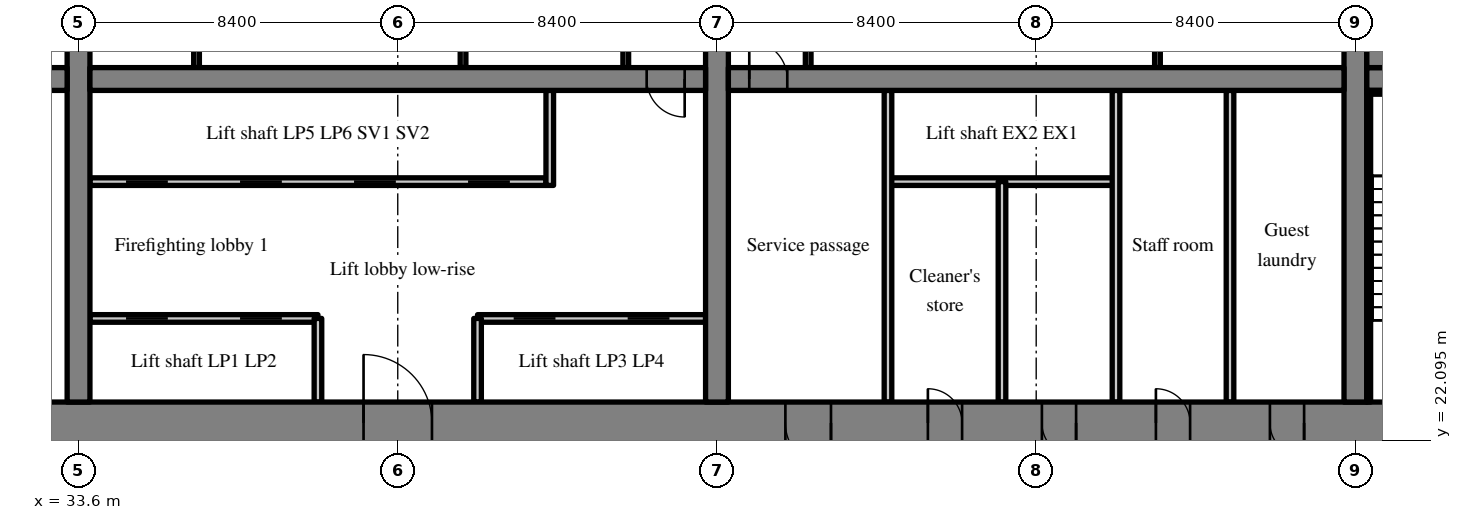
"""IFC4 building model, lengths in metres.
Left out: names, types, materials, properties, quantities, classifications, styles, units other than length and angle.
Written with IfcOpenShell. Run it as: python <this file> out.ifc"""

import sys

from ifc_helpers import new_model, si_unit, direction, frame, frame_2d, origin, place, context, subcontext, project, spatial, rectangle, extrude, source, transform, mapped, element, fill, save


model = new_model("IFC4")
c1 = context("Model", 3, precision=1e-05, world=origin(), true_north=direction((0.0, 1.0)))
c2 = subcontext(c1, "Body", "Model", "MODEL_VIEW")
j1 = project(units=[si_unit("LENGTHUNIT", "METRE"), si_unit("PLANEANGLEUNIT", "RADIAN")], contexts=[c1])
p1 = place(None, origin())
s1 = spatial("IfcSite", under=j1, at=p1, CompositionType="ELEMENT")
p2 = place(p1, origin())
s2 = spatial("IfcBuilding", under=s1, at=p2, CompositionType="ELEMENT")
p3 = place(p2, frame((0.0, 0.0, 39.2)))
s3 = spatial("IfcBuildingStorey", under=s2, at=p3, CompositionType="ELEMENT", Elevation=39.2)
m1 = source(origin(), c2, "Body", "SweptSolid", [
    extrude(rectangle(XDim=50.4, YDim=1.1, at=frame_2d((25.2, 0.0))), origin(), (0.0, 0.0, 1.0), 3.52),
])
p4 = place(p3, frame((25.2, 22.55, 0.0), z_axis=(0.0, 0.0, 1.0), x_axis=(1.0, 0.0, 0.0)))
e1 = element("IfcWall", 1, at=p4, inside=s3, PredefinedType="SHEAR", context=c2, shape_type="MappedRepresentation", body=[
    mapped(m1, transform((0.0, 0.0, 0.0), scale=1.0)),
])
m2 = source(origin(), c2, "Body", "SweptSolid", [
    extrude(rectangle(XDim=1.8, YDim=2.1, at=frame_2d((0.9, 1.05))), frame((0.0, 0.56, 0.0), z_axis=(0.0, -1.0, 0.0), x_axis=(1.0, 0.0, 0.0)), (0.0, 0.0, 1.0), 1.12),
])
p5 = place(p4, frame((15.9, 0.0, 0.0)))
e2 = element("IfcOpeningElement", 2, at=p5, cuts=e1, PredefinedType="OPENING", context=c2, shape_type="MappedRepresentation", body=[
    mapped(m2, transform((0.0, 0.0, 0.0), scale=1.0)),
])
m3 = source(origin(), c2, "Body", "SweptSolid", [
    extrude(rectangle(XDim=1.2, YDim=2.1, at=frame_2d((0.6, 1.05))), frame((0.0, 0.56, 0.0), z_axis=(0.0, -1.0, 0.0), x_axis=(1.0, 0.0, 0.0)), (0.0, 0.0, 1.0), 1.12),
])
p6 = place(p4, frame((27.0, 0.0, 0.0)))
e3 = element("IfcOpeningElement", 3, at=p6, cuts=e1, PredefinedType="OPENING", context=c2, shape_type="MappedRepresentation", body=[
    mapped(m3, transform((0.0, 0.0, 0.0), scale=1.0)),
])
m4 = source(origin(), c2, "Body", "SweptSolid", [
    extrude(rectangle(XDim=0.9, YDim=2.1, at=frame_2d((0.45, 1.05))), frame((0.0, 0.56, 0.0), z_axis=(0.0, -1.0, 0.0), x_axis=(1.0, 0.0, 0.0)), (0.0, 0.0, 1.0), 1.12),
])
p7 = place(p4, frame((33.75, 0.0, 0.0)))
e4 = element("IfcOpeningElement", 4, at=p7, cuts=e1, PredefinedType="OPENING", context=c2, shape_type="MappedRepresentation", body=[
    mapped(m4, transform((0.0, 0.0, 0.0), scale=1.0)),
])
p8 = place(p4, frame((30.75, 0.0, 0.0)))
e5 = element("IfcOpeningElement", 5, at=p8, cuts=e1, PredefinedType="OPENING", context=c2, shape_type="MappedRepresentation", body=[
    mapped(m4, transform((0.0, 0.0, 0.0), scale=1.0)),
])
p9 = place(p4, frame((39.75, 0.0, 0.0)))
e6 = element("IfcOpeningElement", 6, at=p9, cuts=e1, PredefinedType="OPENING", context=c2, shape_type="MappedRepresentation", body=[
    mapped(m4, transform((0.0, 0.0, 0.0), scale=1.0)),
])
p10 = place(p4, frame((36.75, 0.0, 0.0)))
e7 = element("IfcOpeningElement", 7, at=p10, cuts=e1, PredefinedType="OPENING", context=c2, shape_type="MappedRepresentation", body=[
    mapped(m4, transform((0.0, 0.0, 0.0), scale=1.0)),
])
p11 = place(p4, frame((6.425, 0.0, 0.0)))
e8 = element("IfcOpeningElement", 8, at=p11, cuts=e1, PredefinedType="OPENING", context=c2, shape_type="MappedRepresentation", body=[
    mapped(m3, transform((0.0, 0.0, 0.0), scale=1.0)),
])
p12 = place(p4, frame((47.675, 0.0, 0.0)))
e9 = element("IfcOpeningElement", 9, at=p12, cuts=e1, PredefinedType="OPENING", context=c2, shape_type="MappedRepresentation", body=[
    mapped(m3, transform((0.0, 0.0, 0.0), scale=1.0)),
])
m5 = source(origin(), c2, "Body", "SweptSolid", [
    extrude(rectangle(XDim=17.8, YDim=0.6, at=frame_2d((8.9, 0.0))), origin(), (0.0, 0.0, 1.0), 3.52),
])
p13 = place(p3, frame((33.6, 23.1, 0.0), z_axis=(0.0, 0.0, 1.0), x_axis=(0.0, 1.0, 0.0)))
e10 = element("IfcWall", 10, at=p13, inside=s3, PredefinedType="SHEAR", context=c2, shape_type="MappedRepresentation", body=[
    mapped(m5, transform((0.0, 0.0, 0.0), scale=1.0)),
])
m6 = source(origin(), c2, "Body", "SweptSolid", [
    extrude(rectangle(XDim=1.1, YDim=2.1, at=frame_2d((0.55, 1.05))), frame((0.0, 0.31, 0.0), z_axis=(0.0, -1.0, 0.0), x_axis=(1.0, 0.0, 0.0)), (0.0, 0.0, 1.0), 0.62),
])
p14 = place(p13, frame((12.35, 0.0, 0.0)))
e11 = element("IfcOpeningElement", 11, at=p14, cuts=e10, PredefinedType="OPENING", context=c2, shape_type="MappedRepresentation", body=[
    mapped(m6, transform((0.0, 0.0, 0.0), scale=1.0)),
])
p15 = place(p3, frame((50.4, 23.1, 0.0), z_axis=(0.0, 0.0, 1.0), x_axis=(0.0, 1.0, 0.0)))
e12 = element("IfcWall", 12, at=p15, inside=s3, PredefinedType="SHEAR", context=c2, shape_type="MappedRepresentation", body=[
    mapped(m5, transform((0.0, 0.0, 0.0), scale=1.0)),
])
p16 = place(p15, frame((12.35, 0.0, 0.0)))
e13 = element("IfcOpeningElement", 13, at=p16, cuts=e12, PredefinedType="OPENING", context=c2, shape_type="MappedRepresentation", body=[
    mapped(m6, transform((0.0, 0.0, 0.0), scale=1.0)),
])
p17 = place(p3, frame((67.2, 23.1, 0.0), z_axis=(0.0, 0.0, 1.0), x_axis=(0.0, 1.0, 0.0)))
e14 = element("IfcWall", 14, at=p17, inside=s3, PredefinedType="SHEAR", context=c2, shape_type="MappedRepresentation", body=[
    mapped(m5, transform((0.0, 0.0, 0.0), scale=1.0)),
])
m7 = source(origin(), c2, "Body", "SweptSolid", [
    extrude(rectangle(XDim=7.0, YDim=0.6, at=frame_2d((3.5, 0.0))), origin(), (0.0, 0.0, 1.0), 3.52),
])
p18 = place(p3, frame((26.3, 31.6, 0.0), z_axis=(0.0, 0.0, 1.0), x_axis=(1.0, 0.0, 0.0)))
e15 = element("IfcWall", 15, at=p18, inside=s3, PredefinedType="SHEAR", context=c2, shape_type="MappedRepresentation", body=[
    mapped(m7, transform((0.0, 0.0, 0.0), scale=1.0)),
])
p19 = place(p18, frame((5.375, 0.0, 0.0)))
e16 = element("IfcOpeningElement", 16, at=p19, cuts=e15, PredefinedType="OPENING", context=c2, shape_type="MappedRepresentation", body=[
    mapped(m6, transform((0.0, 0.0, 0.0), scale=1.0)),
])
m8 = source(origin(), c2, "Body", "SweptSolid", [
    extrude(rectangle(XDim=16.2, YDim=0.6, at=frame_2d((8.1, 0.0))), origin(), (0.0, 0.0, 1.0), 3.52),
])
p20 = place(p3, frame((33.9, 31.6, 0.0), z_axis=(0.0, 0.0, 1.0), x_axis=(1.0, 0.0, 0.0)))
e17 = element("IfcWall", 17, at=p20, inside=s3, PredefinedType="SHEAR", context=c2, shape_type="MappedRepresentation", body=[
    mapped(m8, transform((0.0, 0.0, 0.0), scale=1.0)),
])
m9 = source(origin(), c2, "Body", "SweptSolid", [
    extrude(rectangle(XDim=1.0, YDim=2.1, at=frame_2d((0.5, 1.05))), frame((0.0, 0.31, 0.0), z_axis=(0.0, -1.0, 0.0), x_axis=(1.0, 0.0, 0.0)), (0.0, 0.0, 1.0), 0.62),
])
p21 = place(p20, frame((14.65, 0.0, 0.0)))
e18 = element("IfcOpeningElement", 18, at=p21, cuts=e17, PredefinedType="OPENING", context=c2, shape_type="MappedRepresentation", body=[
    mapped(m9, transform((0.0, 0.0, 0.0), scale=1.0)),
])
m10 = source(origin(), c2, "Body", "SweptSolid", [
    extrude(rectangle(XDim=16.2, YDim=0.6, at=frame_2d((8.1, 0.0))), origin(), (0.0, 0.0, 1.0), 3.52),
])
p22 = place(p3, frame((50.7, 31.6, 0.0), z_axis=(0.0, 0.0, 1.0), x_axis=(1.0, 0.0, 0.0)))
e19 = element("IfcWall", 19, at=p22, inside=s3, PredefinedType="SHEAR", context=c2, shape_type="MappedRepresentation", body=[
    mapped(m10, transform((0.0, 0.0, 0.0), scale=1.0)),
])
p23 = place(p22, frame((0.55, 0.0, 0.0)))
e20 = element("IfcOpeningElement", 20, at=p23, cuts=e19, PredefinedType="OPENING", context=c2, shape_type="MappedRepresentation", body=[
    mapped(m9, transform((0.0, 0.0, 0.0), scale=1.0)),
])
p24 = place(p3, frame((67.5, 31.6, 0.0), z_axis=(0.0, 0.0, 1.0), x_axis=(1.0, 0.0, 0.0)))
e21 = element("IfcWall", 21, at=p24, inside=s3, PredefinedType="SHEAR", context=c2, shape_type="MappedRepresentation", body=[
    mapped(m7, transform((0.0, 0.0, 0.0), scale=1.0)),
])
p25 = place(p24, frame((5.425, 0.0, 0.0)))
e22 = element("IfcOpeningElement", 22, at=p25, cuts=e21, PredefinedType="OPENING", context=c2, shape_type="MappedRepresentation", body=[
    mapped(m6, transform((0.0, 0.0, 0.0), scale=1.0)),
])
m11 = source(origin(), c2, "Body", "SweptSolid", [
    extrude(rectangle(XDim=6.0, YDim=0.2, at=frame_2d((3.0, 0.0))), origin(), (0.0, 0.0, 1.0), 3.52),
])
p26 = place(p3, frame((33.9, 25.3, 0.0), z_axis=(0.0, 0.0, 1.0), x_axis=(1.0, 0.0, 0.0)))
e23 = element("IfcWall", 23, at=p26, inside=s3, PredefinedType="SOLIDWALL", context=c2, shape_type="MappedRepresentation", body=[
    mapped(m11, transform((0.0, 0.0, 0.0), scale=1.0)),
])
m12 = source(origin(), c2, "Body", "SweptSolid", [
    extrude(rectangle(XDim=1.1, YDim=2.1, at=frame_2d((0.55, 1.05))), frame((0.0, 0.11, 0.0), z_axis=(0.0, -1.0, 0.0), x_axis=(1.0, 0.0, 0.0)), (0.0, 0.0, 1.0), 0.22),
])
p27 = place(p26, frame((0.95, 0.0, 0.0)))
e24 = element("IfcOpeningElement", 24, at=p27, cuts=e23, PredefinedType="OPENING", context=c2, shape_type="MappedRepresentation", body=[
    mapped(m12, transform((0.0, 0.0, 0.0), scale=1.0)),
])
p28 = place(p26, frame((3.95, 0.0, 0.0)))
e25 = element("IfcOpeningElement", 25, at=p28, cuts=e23, PredefinedType="OPENING", context=c2, shape_type="MappedRepresentation", body=[
    mapped(m12, transform((0.0, 0.0, 0.0), scale=1.0)),
])
p29 = place(p3, frame((44.1, 25.3, 0.0), z_axis=(0.0, 0.0, 1.0), x_axis=(1.0, 0.0, 0.0)))
e26 = element("IfcWall", 26, at=p29, inside=s3, PredefinedType="SOLIDWALL", context=c2, shape_type="MappedRepresentation", body=[
    mapped(m11, transform((0.0, 0.0, 0.0), scale=1.0)),
])
p30 = place(p29, frame((0.95, 0.0, 0.0)))
e27 = element("IfcOpeningElement", 27, at=p30, cuts=e26, PredefinedType="OPENING", context=c2, shape_type="MappedRepresentation", body=[
    mapped(m12, transform((0.0, 0.0, 0.0), scale=1.0)),
])
p31 = place(p29, frame((3.95, 0.0, 0.0)))
e28 = element("IfcOpeningElement", 28, at=p31, cuts=e26, PredefinedType="OPENING", context=c2, shape_type="MappedRepresentation", body=[
    mapped(m12, transform((0.0, 0.0, 0.0), scale=1.0)),
])
m13 = source(origin(), c2, "Body", "SweptSolid", [
    extrude(rectangle(XDim=12.0, YDim=0.2, at=frame_2d((6.0, 0.0))), origin(), (0.0, 0.0, 1.0), 3.52),
])
p32 = place(p3, frame((33.9, 28.9, 0.0), z_axis=(0.0, 0.0, 1.0), x_axis=(1.0, 0.0, 0.0)))
e29 = element("IfcWall", 29, at=p32, inside=s3, PredefinedType="SOLIDWALL", context=c2, shape_type="MappedRepresentation", body=[
    mapped(m13, transform((0.0, 0.0, 0.0), scale=1.0)),
])
p33 = place(p32, frame((0.95, 0.0, 0.0)))
e30 = element("IfcOpeningElement", 30, at=p33, cuts=e29, PredefinedType="OPENING", context=c2, shape_type="MappedRepresentation", body=[
    mapped(m12, transform((0.0, 0.0, 0.0), scale=1.0)),
])
p34 = place(p32, frame((3.95, 0.0, 0.0)))
e31 = element("IfcOpeningElement", 31, at=p34, cuts=e29, PredefinedType="OPENING", context=c2, shape_type="MappedRepresentation", body=[
    mapped(m12, transform((0.0, 0.0, 0.0), scale=1.0)),
])
p35 = place(p32, frame((6.95, 0.0, 0.0)))
e32 = element("IfcOpeningElement", 32, at=p35, cuts=e29, PredefinedType="OPENING", context=c2, shape_type="MappedRepresentation", body=[
    mapped(m12, transform((0.0, 0.0, 0.0), scale=1.0)),
])
p36 = place(p32, frame((9.95, 0.0, 0.0)))
e33 = element("IfcOpeningElement", 33, at=p36, cuts=e29, PredefinedType="OPENING", context=c2, shape_type="MappedRepresentation", body=[
    mapped(m12, transform((0.0, 0.0, 0.0), scale=1.0)),
])
m14 = source(origin(), c2, "Body", "SweptSolid", [
    extrude(rectangle(XDim=2.2, YDim=0.2, at=frame_2d((1.1, 0.0))), origin(), (0.0, 0.0, 1.0), 3.52),
])
for number, where, z_axis, x_axis in (
    (34, (39.9, 23.1, 0.0), (0.0, 0.0, 1.0), (0.0, 1.0, 0.0)),
    (35, (44.1, 23.1, 0.0), (0.0, 0.0, 1.0), (0.0, 1.0, 0.0)),
):
    element("IfcWall", number, at=place(p3, frame(where, z_axis=z_axis, x_axis=x_axis)), inside=s3, PredefinedType="SOLIDWALL", context=c2, shape_type="MappedRepresentation", body=[
        mapped(m14, transform((0.0, 0.0, 0.0), scale=1.0)),
    ])
m15 = source(origin(), c2, "Body", "SweptSolid", [
    extrude(rectangle(XDim=2.5, YDim=0.2, at=frame_2d((1.25, 0.0))), origin(), (0.0, 0.0, 1.0), 3.52),
])
p37 = place(p3, frame((46.0, 28.8, 0.0), z_axis=(0.0, 0.0, 1.0), x_axis=(0.0, 1.0, 0.0)))
e36 = element("IfcWall", 36, at=p37, inside=s3, PredefinedType="SOLIDWALL", context=c2, shape_type="MappedRepresentation", body=[
    mapped(m15, transform((0.0, 0.0, 0.0), scale=1.0)),
])
m16 = source(origin(), c2, "Body", "SweptSolid", [
    extrude(rectangle(XDim=3.1, YDim=0.15, at=frame_2d((1.55, 0.0))), origin(), (0.0, 0.0, 1.0), 3.52),
])
for number, where, z_axis, x_axis in (
    (37, (48.0, 31.9, 0.0), (0.0, 0.0, 1.0), (0.0, 1.0, 0.0)),
    (38, (36.705, 31.9, 0.0), (0.0, 0.0, 1.0), (0.0, 1.0, 0.0)),
    (39, (43.718, 31.9, 0.0), (0.0, 0.0, 1.0), (0.0, 1.0, 0.0)),
):
    element("IfcWall", number, at=place(p3, frame(where, z_axis=z_axis, x_axis=x_axis)), inside=s3, PredefinedType="PARTITIONING", context=c2, shape_type="MappedRepresentation", body=[
        mapped(m16, transform((0.0, 0.0, 0.0), scale=1.0)),
    ])
p38 = place(p3, frame((60.9, 28.9, 0.0), z_axis=(0.0, 0.0, 1.0), x_axis=(-1.0, 0.0, 0.0)))
e40 = element("IfcWall", 40, at=p38, inside=s3, PredefinedType="SOLIDWALL", context=c2, shape_type="MappedRepresentation", body=[
    mapped(m11, transform((0.0, 0.0, 0.0), scale=1.0)),
])
m17 = source(origin(), c2, "Body", "SweptSolid", [
    extrude(rectangle(XDim=8.2, YDim=0.2, at=frame_2d((4.1, 0.0))), origin(), (0.0, 0.0, 1.0), 3.52),
])
for number, where, z_axis, x_axis in (
    (41, (54.9, 23.1, 0.0), (0.0, 0.0, 1.0), (0.0, 1.0, 0.0)),
    (42, (60.9, 23.1, 0.0), (0.0, 0.0, 1.0), (0.0, 1.0, 0.0)),
):
    element("IfcWall", number, at=place(p3, frame(where, z_axis=z_axis, x_axis=x_axis)), inside=s3, PredefinedType="PARTITIONING", context=c2, shape_type="MappedRepresentation", body=[
        mapped(m17, transform((0.0, 0.0, 0.0), scale=1.0)),
    ])
m18 = source(origin(), c2, "Body", "SweptSolid", [
    extrude(rectangle(XDim=5.8, YDim=0.2, at=frame_2d((2.9, 0.0))), origin(), (0.0, 0.0, 1.0), 3.52),
])
p39 = place(p3, frame((57.9, 23.1, 0.0), z_axis=(0.0, 0.0, 1.0), x_axis=(0.0, 1.0, 0.0)))
e43 = element("IfcWall", 43, at=p39, inside=s3, PredefinedType="PARTITIONING", context=c2, shape_type="MappedRepresentation", body=[
    mapped(m18, transform((0.0, 0.0, 0.0), scale=1.0)),
])
p40 = place(p3, frame((63.9, 23.1, 0.0), z_axis=(0.0, 0.0, 1.0), x_axis=(0.0, 1.0, 0.0)))
e44 = element("IfcWall", 44, at=p40, inside=s3, PredefinedType="PARTITIONING", context=c2, shape_type="MappedRepresentation", body=[
    mapped(m17, transform((0.0, 0.0, 0.0), scale=1.0)),
])
for number, where, z_axis, x_axis in (
    (45, (52.8, 31.9, 0.0), (0.0, 0.0, 1.0), (0.0, 1.0, 0.0)),
    (46, (61.991, 31.9, 0.0), (0.0, 0.0, 1.0), (0.0, 1.0, 0.0)),
):
    element("IfcWall", number, at=place(p3, frame(where, z_axis=z_axis, x_axis=x_axis)), inside=s3, PredefinedType="PARTITIONING", context=c2, shape_type="MappedRepresentation", body=[
        mapped(m16, transform((0.0, 0.0, 0.0), scale=1.0)),
    ])
m19 = source(origin(), c2, "Body", "SweptSolid", [
    extrude(rectangle(XDim=4.75, YDim=0.1, at=frame_2d((2.375, 0.0))), origin(), (0.0, 0.0, 1.0), 3.52),
])
p41 = place(p3, frame((67.5, 31.25, 0.0), z_axis=(0.0, 0.0, 1.0), x_axis=(1.0, 0.0, 0.0)))
e47 = element("IfcWall", 47, at=p41, inside=s3, PredefinedType="SOLIDWALL", context=c2, shape_type="MappedRepresentation", body=[
    mapped(m19, transform((0.0, 0.0, 0.0), scale=1.0)),
])
m20 = source(origin(), c2, "Body", "SweptSolid", [
    extrude(rectangle(XDim=8.1, YDim=0.1, at=frame_2d((4.05, 0.0))), origin(), (0.0, 0.0, 1.0), 3.52),
])
p42 = place(p3, frame((67.55, 23.1, 0.0), z_axis=(0.0, 0.0, 1.0), x_axis=(0.0, 1.0, 0.0)))
e48 = element("IfcWall", 48, at=p42, inside=s3, PredefinedType="SOLIDWALL", context=c2, shape_type="MappedRepresentation", body=[
    mapped(m20, transform((0.0, 0.0, 0.0), scale=1.0)),
])
m21 = source(origin(), c2, "Body", "SweptSolid", [
    extrude(rectangle(XDim=4.75, YDim=0.9, at=frame_2d((2.375, 0.0))), origin(), (0.0, 0.0, 1.0), 3.52),
])
p43 = place(p3, frame((67.5, 32.35, 0.0), z_axis=(0.0, 0.0, 1.0), x_axis=(1.0, 0.0, 0.0)))
e49 = element("IfcWall", 49, at=p43, inside=s3, PredefinedType="SOLIDWALL", context=c2, shape_type="MappedRepresentation", body=[
    mapped(m21, transform((0.0, 0.0, 0.0), scale=1.0)),
])
m22 = source(origin(), c2, "Body", "SweptSolid", [
    extrude(rectangle(XDim=1.8, YDim=2.1, at=frame_2d((0.9, 1.05))), frame((0.0, 0.325, 0.0), z_axis=(0.0, -1.0, 0.0), x_axis=(1.0, 0.0, 0.0)), (0.0, 0.0, 1.0), 0.05),
])
p44 = place(p5, origin())
e50 = element("IfcDoor", 50, at=p44, inside=s3, OperationType="DOUBLE_DOOR_SINGLE_SWING", PredefinedType="DOOR", context=c2, shape_type="MappedRepresentation", body=[
    mapped(m22, transform((0.0, 0.0, 0.0), scale=1.0)),
])
fill(e2, e50)
m23 = source(origin(), c2, "Body", "SweptSolid", [
    extrude(rectangle(XDim=1.0, YDim=2.1, at=frame_2d((0.5, 1.05))), frame((0.0, 0.025, 0.0), z_axis=(0.0, -1.0, 0.0), x_axis=(1.0, 0.0, 0.0)), (0.0, 0.0, 1.0), 0.05),
])
p45 = place(p21, origin())
e51 = element("IfcDoor", 51, at=p45, inside=s3, OperationType="SINGLE_SWING_RIGHT", PredefinedType="DOOR", context=c2, shape_type="MappedRepresentation", body=[
    mapped(m23, transform((0.0, 0.0, 0.0), scale=1.0)),
])
fill(e18, e51)
m24 = source(origin(), c2, "Body", "SweptSolid", [
    extrude(rectangle(XDim=1.1, YDim=2.1, at=frame_2d((0.55, 1.05))), frame((0.0, 0.025, 0.0), z_axis=(0.0, -1.0, 0.0), x_axis=(1.0, 0.0, 0.0)), (0.0, 0.0, 1.0), 0.05),
])
p46 = place(p27, origin())
e52 = element("IfcDoor", 52, at=p46, inside=s3, OperationType="SLIDING_TO_LEFT", PredefinedType="DOOR", context=c2, shape_type="MappedRepresentation", body=[
    mapped(m24, transform((0.0, 0.0, 0.0), scale=1.0)),
])
fill(e24, e52)
p47 = place(p28, origin())
e53 = element("IfcDoor", 53, at=p47, inside=s3, OperationType="SLIDING_TO_RIGHT", PredefinedType="DOOR", context=c2, shape_type="MappedRepresentation", body=[
    mapped(m24, transform((0.0, 0.0, 0.0), scale=1.0)),
])
fill(e25, e53)
p48 = place(p30, origin())
e54 = element("IfcDoor", 54, at=p48, inside=s3, OperationType="SLIDING_TO_LEFT", PredefinedType="DOOR", context=c2, shape_type="MappedRepresentation", body=[
    mapped(m24, transform((0.0, 0.0, 0.0), scale=1.0)),
])
fill(e27, e54)
p49 = place(p31, origin())
e55 = element("IfcDoor", 55, at=p49, inside=s3, OperationType="SLIDING_TO_RIGHT", PredefinedType="DOOR", context=c2, shape_type="MappedRepresentation", body=[
    mapped(m24, transform((0.0, 0.0, 0.0), scale=1.0)),
])
fill(e28, e55)
p50 = place(p33, origin())
e56 = element("IfcDoor", 56, at=p50, inside=s3, OperationType="SLIDING_TO_LEFT", PredefinedType="DOOR", context=c2, shape_type="MappedRepresentation", body=[
    mapped(m24, transform((0.0, 0.0, 0.0), scale=1.0)),
])
fill(e30, e56)
p51 = place(p34, origin())
e57 = element("IfcDoor", 57, at=p51, inside=s3, OperationType="SLIDING_TO_RIGHT", PredefinedType="DOOR", context=c2, shape_type="MappedRepresentation", body=[
    mapped(m24, transform((0.0, 0.0, 0.0), scale=1.0)),
])
fill(e31, e57)
p52 = place(p35, origin())
e58 = element("IfcDoor", 58, at=p52, inside=s3, OperationType="SLIDING_TO_LEFT", PredefinedType="DOOR", context=c2, shape_type="MappedRepresentation", body=[
    mapped(m24, transform((0.0, 0.0, 0.0), scale=1.0)),
])
fill(e32, e58)
p53 = place(p36, origin())
e59 = element("IfcDoor", 59, at=p53, inside=s3, OperationType="SLIDING_TO_RIGHT", PredefinedType="DOOR", context=c2, shape_type="MappedRepresentation", body=[
    mapped(m24, transform((0.0, 0.0, 0.0), scale=1.0)),
])
fill(e33, e59)
m25 = source(origin(), c2, "Body", "SweptSolid", [
    extrude(rectangle(XDim=1.2, YDim=2.1, at=frame_2d((0.6, 1.05))), frame((0.0, 0.325, 0.0), z_axis=(0.0, -1.0, 0.0), x_axis=(1.0, 0.0, 0.0)), (0.0, 0.0, 1.0), 0.05),
])
p54 = place(p6, origin())
e60 = element("IfcDoor", 60, at=p54, inside=s3, OperationType="SINGLE_SWING_RIGHT", PredefinedType="DOOR", context=c2, shape_type="MappedRepresentation", body=[
    mapped(m25, transform((0.0, 0.0, 0.0), scale=1.0)),
])
fill(e3, e60)
p55 = place(p23, origin())
e61 = element("IfcDoor", 61, at=p55, inside=s3, OperationType="SINGLE_SWING_LEFT", PredefinedType="DOOR", context=c2, shape_type="MappedRepresentation", body=[
    mapped(m23, transform((0.0, 0.0, 0.0), scale=1.0)),
])
fill(e20, e61)
m26 = source(origin(), c2, "Body", "SweptSolid", [
    extrude(rectangle(XDim=0.9, YDim=2.1, at=frame_2d((0.45, 1.05))), frame((0.0, 0.325, 0.0), z_axis=(0.0, -1.0, 0.0), x_axis=(1.0, 0.0, 0.0)), (0.0, 0.0, 1.0), 0.05),
])
p56 = place(p7, origin())
e62 = element("IfcDoor", 62, at=p56, inside=s3, OperationType="SINGLE_SWING_RIGHT", PredefinedType="DOOR", context=c2, shape_type="MappedRepresentation", body=[
    mapped(m26, transform((0.0, 0.0, 0.0), scale=1.0)),
])
fill(e4, e62)
p57 = place(p8, origin())
e63 = element("IfcDoor", 63, at=p57, inside=s3, OperationType="SINGLE_SWING_LEFT", PredefinedType="DOOR", context=c2, shape_type="MappedRepresentation", body=[
    mapped(m26, transform((0.0, 0.0, 0.0), scale=1.0)),
])
fill(e5, e63)
p58 = place(p9, origin())
e64 = element("IfcDoor", 64, at=p58, inside=s3, OperationType="SINGLE_SWING_RIGHT", PredefinedType="DOOR", context=c2, shape_type="MappedRepresentation", body=[
    mapped(m26, transform((0.0, 0.0, 0.0), scale=1.0)),
])
fill(e6, e64)
p59 = place(p10, origin())
e65 = element("IfcDoor", 65, at=p59, inside=s3, OperationType="SINGLE_SWING_LEFT", PredefinedType="DOOR", context=c2, shape_type="MappedRepresentation", body=[
    mapped(m26, transform((0.0, 0.0, 0.0), scale=1.0)),
])
fill(e7, e65)
save(model, sys.argv[1])
